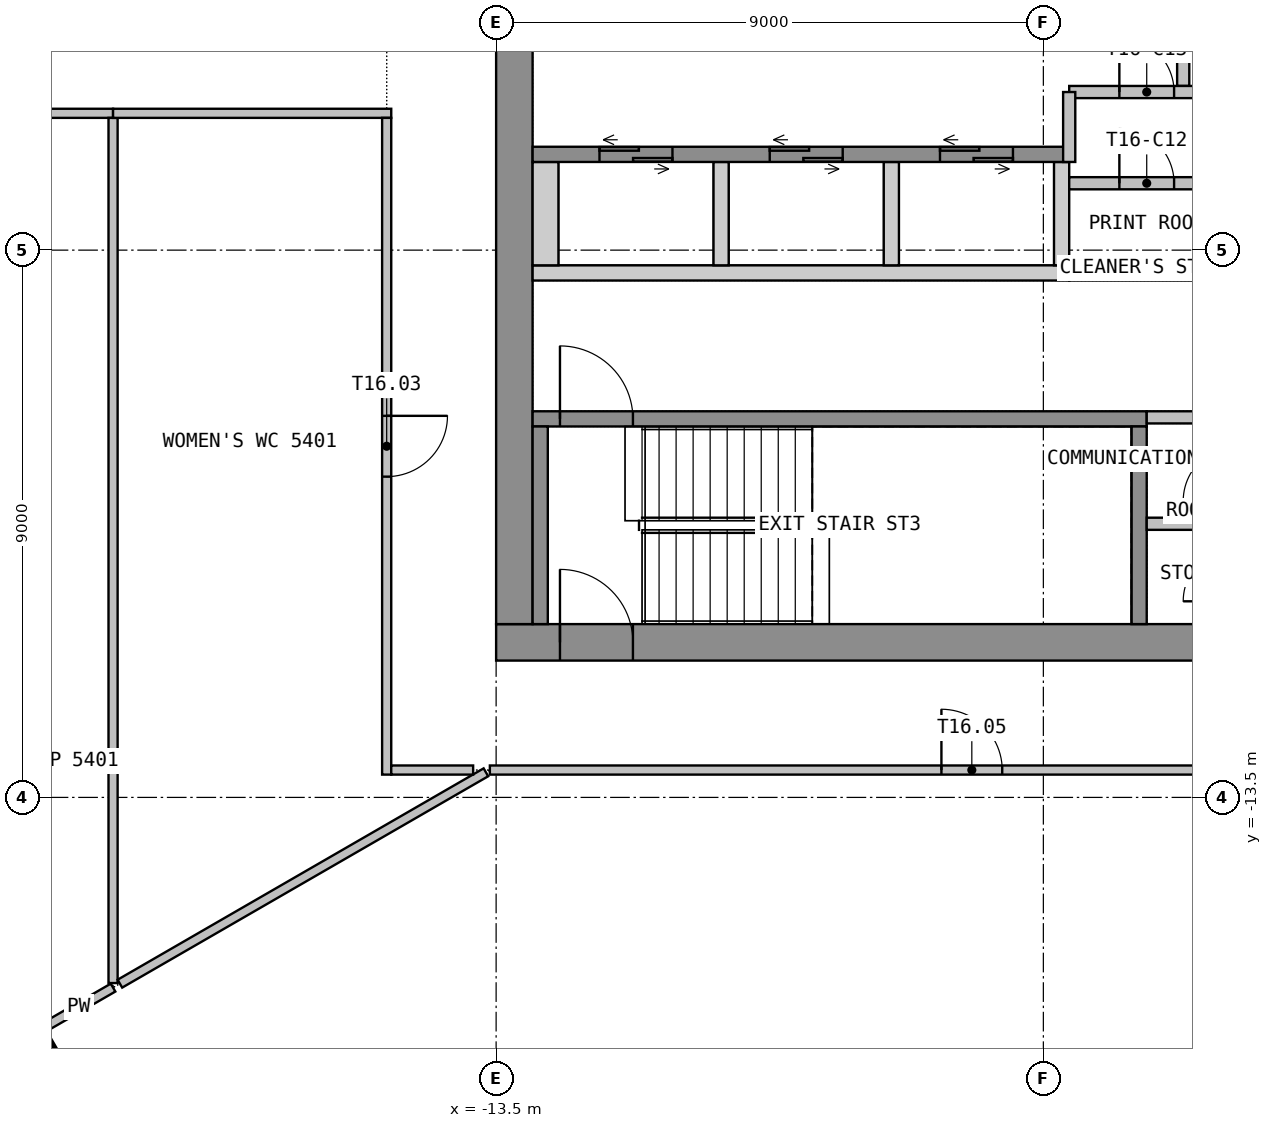
"""IFC4 building model, lengths in metres.
Left out: names, types, materials, properties, quantities, classifications, styles, units other than length and angle.
Written with IfcOpenShell. Run it as: python <this file> out.ifc"""

import sys

from ifc_helpers import new_model, si_unit, direction, frame, frame_2d, origin, origin_2d, place, context, subcontext, project, spatial, polyline, rectangle, outline, extrude, element, fill, save


model = new_model("IFC4")
c1 = context("Model", 3, precision=1e-05, world=origin(), true_north=direction((0.0, 1.0)))
c2 = subcontext(c1, "Body", "Model", "MODEL_VIEW")
j1 = project(units=[si_unit("LENGTHUNIT", "METRE"), si_unit("PLANEANGLEUNIT", "RADIAN")], contexts=[c1])
p1 = place(None, origin())
s1 = spatial("IfcSite", under=j1, at=p1, CompositionType="ELEMENT")
p2 = place(p1, origin())
s2 = spatial("IfcBuilding", under=s1, at=p2, CompositionType="ELEMENT")
p3 = place(p2, frame((0.0, 0.0, 219.0)))
s3 = spatial("IfcBuildingStorey", under=s2, at=p3, CompositionType="ELEMENT", Elevation=219.0)
p4 = place(p3, frame((-21.421, -17.563, 0.0), z_axis=(0.0, 0.0, 1.0), x_axis=(0.5, -0.866025403784, 0.0)))
e1 = element("IfcColumn", 1, at=p4, inside=s3, PredefinedType="COLUMN", context=c2, shape_type="SweptSolid", body=[
    extrude(rectangle(XDim=0.8, YDim=1.1, at=origin_2d()), origin(), (0.0, 0.0, 1.0), 3.55),
])
p5 = place(p3, frame((-13.5, -10.95, 0.0), z_axis=(0.0, 0.0, 1.0), x_axis=(1.0, 0.0, 0.0)))
e2 = element("IfcWall", 2, at=p5, inside=s3, PredefinedType="SHEAR", context=c2, shape_type="SweptSolid", body=[
    extrude(rectangle(XDim=27.0, YDim=0.6, at=frame_2d((13.5, 0.0))), origin(), (0.0, 0.0, 1.0), 3.55),
])
p6 = place(p5, frame((12.3, 0.0, 0.0)))
e3 = element("IfcOpeningElement", 3, at=p6, cuts=e2, PredefinedType="OPENING", context=c2, shape_type="SweptSolid", body=[
    extrude(rectangle(XDim=2.4, YDim=2.1, at=frame_2d((1.2, 1.05))), frame((0.0, 0.31, 0.0), z_axis=(0.0, -1.0, 0.0), x_axis=(1.0, 0.0, 0.0)), (0.0, 0.0, 1.0), 0.62),
])
p7 = place(p5, frame((1.05, 0.0, 0.0)))
e4 = element("IfcOpeningElement", 4, at=p7, cuts=e2, PredefinedType="OPENING", context=c2, shape_type="SweptSolid", body=[
    extrude(rectangle(XDim=1.2, YDim=2.1, at=frame_2d((0.6, 1.05))), frame((0.0, 0.31, 0.0), z_axis=(0.0, -1.0, 0.0), x_axis=(1.0, 0.0, 0.0)), (0.0, 0.0, 1.0), 0.62),
])
p8 = place(p5, frame((24.75, 0.0, 0.0)))
e5 = element("IfcOpeningElement", 5, at=p8, cuts=e2, PredefinedType="OPENING", context=c2, shape_type="SweptSolid", body=[
    extrude(rectangle(XDim=1.2, YDim=2.1, at=frame_2d((0.6, 1.05))), frame((0.0, 0.31, 0.0), z_axis=(0.0, -1.0, 0.0), x_axis=(1.0, 0.0, 0.0)), (0.0, 0.0, 1.0), 0.62),
])
p9 = place(p3, frame((-13.2, -10.65, 0.0), z_axis=(0.0, 0.0, 1.0), x_axis=(0.0, 1.0, 0.0)))
e6 = element("IfcWall", 6, at=p9, inside=s3, PredefinedType="SHEAR", context=c2, shape_type="SweptSolid", body=[
    extrude(rectangle(XDim=21.3, YDim=0.6, at=frame_2d((10.65, 0.0))), origin(), (0.0, 0.0, 1.0), 3.55),
])
p10 = place(p9, frame((9.45, 0.0, 0.0)))
e7 = element("IfcOpeningElement", 7, at=p10, cuts=e6, PredefinedType="OPENING", context=c2, shape_type="SweptSolid", body=[
    extrude(rectangle(XDim=2.4, YDim=2.1, at=frame_2d((1.2, 1.05))), frame((0.0, 0.31, 0.0), z_axis=(0.0, -1.0, 0.0), x_axis=(1.0, 0.0, 0.0)), (0.0, 0.0, 1.0), 0.62),
])
p11 = place(p3, origin())
e8 = element("IfcWall", 8, at=p11, inside=s3, PredefinedType="SHEAR", context=c2, shape_type="SweptSolid", body=[
    extrude(outline(polyline([(-12.9, -5.0), (-4.075, -5.0), (-4.075, -4.75), (-12.9, -4.75), (-12.9, -5.0)])), origin(), (0.0, 0.0, 1.0), 3.55),
])
p12 = place(p3, origin())
e9 = element("IfcWall", 9, at=p12, inside=s3, PredefinedType="SHEAR", context=c2, shape_type="SweptSolid", body=[
    extrude(outline(polyline([(-12.9, -4.75), (-12.475, -4.75), (-12.475, -3.05), (-12.9, -3.05), (-12.9, -4.75)])), origin(), (0.0, 0.0, 1.0), 3.55),
])
p13 = place(p3, origin())
e10 = element("IfcWall", 10, at=p13, inside=s3, PredefinedType="SHEAR", context=c2, shape_type="SweptSolid", body=[
    extrude(outline(polyline([(-9.925, -4.75), (-9.675, -4.75), (-9.675, -3.05), (-9.925, -3.05), (-9.925, -4.75)])), origin(), (0.0, 0.0, 1.0), 3.55),
])
p14 = place(p3, origin())
e11 = element("IfcWall", 11, at=p14, inside=s3, PredefinedType="SHEAR", context=c2, shape_type="SweptSolid", body=[
    extrude(outline(polyline([(-7.125, -4.75), (-6.875, -4.75), (-6.875, -3.05), (-7.125, -3.05), (-7.125, -4.75)])), origin(), (0.0, 0.0, 1.0), 3.55),
])
p15 = place(p3, origin())
e12 = element("IfcWall", 12, at=p15, inside=s3, PredefinedType="SHEAR", context=c2, shape_type="SweptSolid", body=[
    extrude(outline(polyline([(-4.325, -4.75), (-4.075, -4.75), (-4.075, -3.05), (-4.325, -3.05), (-4.325, -4.75)])), origin(), (0.0, 0.0, 1.0), 3.55),
])
p16 = place(p3, frame((-12.9, -2.925, 0.0), z_axis=(0.0, 0.0, 1.0), x_axis=(1.0, 0.0, 0.0)))
e13 = element("IfcWall", 13, at=p16, inside=s3, PredefinedType="SHEAR", context=c2, shape_type="SweptSolid", body=[
    extrude(rectangle(XDim=8.825, YDim=0.25, at=frame_2d((4.413, 0.0))), origin(), (0.0, 0.0, 1.0), 3.55),
])
p17 = place(p16, frame((1.1, 0.0, 0.0)))
e14 = element("IfcOpeningElement", 14, at=p17, cuts=e13, PredefinedType="OPENING", context=c2, shape_type="SweptSolid", body=[
    extrude(rectangle(XDim=1.2, YDim=2.1, at=frame_2d((0.6, 1.05))), frame((0.0, 0.135, 0.0), z_axis=(0.0, -1.0, 0.0), x_axis=(1.0, 0.0, 0.0)), (0.0, 0.0, 1.0), 0.27),
])
p18 = place(p16, frame((3.9, 0.0, 0.0)))
e15 = element("IfcOpeningElement", 15, at=p18, cuts=e13, PredefinedType="OPENING", context=c2, shape_type="SweptSolid", body=[
    extrude(rectangle(XDim=1.2, YDim=2.1, at=frame_2d((0.6, 1.05))), frame((0.0, 0.135, 0.0), z_axis=(0.0, -1.0, 0.0), x_axis=(1.0, 0.0, 0.0)), (0.0, 0.0, 1.0), 0.27),
])
p19 = place(p16, frame((6.7, 0.0, 0.0)))
e16 = element("IfcOpeningElement", 16, at=p19, cuts=e13, PredefinedType="OPENING", context=c2, shape_type="SweptSolid", body=[
    extrude(rectangle(XDim=1.2, YDim=2.1, at=frame_2d((0.6, 1.05))), frame((0.0, 0.135, 0.0), z_axis=(0.0, -1.0, 0.0), x_axis=(1.0, 0.0, 0.0)), (0.0, 0.0, 1.0), 0.27),
])
p20 = place(p3, frame((-2.2, -1.8, 0.0), z_axis=(0.0, 0.0, 1.0), x_axis=(0.0, 1.0, 0.0)))
e17 = element("IfcWall", 17, at=p20, inside=s3, PredefinedType="PARTITIONING", context=c2, shape_type="SweptSolid", body=[
    extrude(rectangle(XDim=3.6, YDim=0.2, at=frame_2d((1.8, 0.0))), origin(), (0.0, 0.0, 1.0), 3.55),
])
p21 = place(p20, frame((1.2, 0.0, 0.0)))
e18 = element("IfcOpeningElement", 18, at=p21, cuts=e17, PredefinedType="OPENING", context=c2, shape_type="SweptSolid", body=[
    extrude(rectangle(XDim=1.2, YDim=2.1, at=frame_2d((0.6, 1.05))), frame((0.0, 0.11, 0.0), z_axis=(0.0, -1.0, 0.0), x_axis=(1.0, 0.0, 0.0)), (0.0, 0.0, 1.0), 0.22),
])
p22 = place(p3, frame((-12.9, -7.275, 0.0), z_axis=(0.0, 0.0, 1.0), x_axis=(1.0, 0.0, 0.0)))
e19 = element("IfcWall", 19, at=p22, inside=s3, PredefinedType="SHEAR", context=c2, shape_type="SweptSolid", body=[
    extrude(rectangle(XDim=10.1, YDim=0.25, at=frame_2d((5.05, 0.0))), origin(), (0.0, 0.0, 1.0), 3.55),
])
p23 = place(p22, frame((0.45, 0.0, 0.0)))
e20 = element("IfcOpeningElement", 20, at=p23, cuts=e19, PredefinedType="OPENING", context=c2, shape_type="SweptSolid", body=[
    extrude(rectangle(XDim=1.2, YDim=2.1, at=frame_2d((0.6, 1.05))), frame((0.0, 0.135, 0.0), z_axis=(0.0, -1.0, 0.0), x_axis=(1.0, 0.0, 0.0)), (0.0, 0.0, 1.0), 0.27),
])
for number, where, z_axis, x_axis in (
    (21, (-12.775, -10.65, 0.0), (0.0, 0.0, 1.0), (0.0, 1.0, 0.0)),
    (22, (-2.925, -10.65, 0.0), (0.0, 0.0, 1.0), (0.0, 1.0, 0.0)),
):
    element("IfcWall", number, at=place(p3, frame(where, z_axis=z_axis, x_axis=x_axis)), inside=s3, PredefinedType="SHEAR", context=c2, shape_type="SweptSolid", body=[
        extrude(rectangle(XDim=3.25, YDim=0.25, at=frame_2d((1.625, 0.0))), origin(), (0.0, 0.0, 1.0), 3.55),
    ])
for number, where, z_axis, x_axis in (
    (23, (-2.8, -7.25, 0.0), (0.0, 0.0, 1.0), (1.0, 0.0, 0.0)),
    (24, (-2.8, -9.0, 0.0), (0.0, 0.0, 1.0), (1.0, 0.0, 0.0)),
):
    element("IfcWall", number, at=place(p3, frame(where, z_axis=z_axis, x_axis=x_axis)), inside=s3, PredefinedType="PARTITIONING", context=c2, shape_type="SweptSolid", body=[
        extrude(rectangle(XDim=1.4, YDim=0.2, at=frame_2d((0.7, 0.0))), origin(), (0.0, 0.0, 1.0), 3.55),
    ])
p24 = place(p3, frame((-4.075, -3.4, 0.0), z_axis=(0.0, 0.0, 1.0), x_axis=(1.0, 0.0, 0.0)))
e25 = element("IfcWall", 25, at=p24, inside=s3, PredefinedType="PARTITIONING", context=c2, shape_type="SweptSolid", body=[
    extrude(rectangle(XDim=2.55, YDim=0.2, at=frame_2d((1.275, 0.0))), origin(), (0.0, 0.0, 1.0), 3.55),
])
p25 = place(p24, frame((0.825, 0.0, 0.0)))
e26 = element("IfcOpeningElement", 26, at=p25, cuts=e25, PredefinedType="OPENING", context=c2, shape_type="SweptSolid", body=[
    extrude(rectangle(XDim=0.9, YDim=2.1, at=frame_2d((0.45, 1.05))), frame((0.0, 0.11, 0.0), z_axis=(0.0, -1.0, 0.0), x_axis=(1.0, 0.0, 0.0)), (0.0, 0.0, 1.0), 0.22),
])
p26 = place(p3, frame((-4.075, -1.9, 0.0), z_axis=(0.0, 0.0, 1.0), x_axis=(1.0, 0.0, 0.0)))
e27 = element("IfcWall", 27, at=p26, inside=s3, PredefinedType="PARTITIONING", context=c2, shape_type="SweptSolid", body=[
    extrude(rectangle(XDim=2.55, YDim=0.2, at=frame_2d((1.275, 0.0))), origin(), (0.0, 0.0, 1.0), 3.55),
])
p27 = place(p26, frame((0.825, 0.0, 0.0)))
e28 = element("IfcOpeningElement", 28, at=p27, cuts=e27, PredefinedType="OPENING", context=c2, shape_type="SweptSolid", body=[
    extrude(rectangle(XDim=0.9, YDim=2.1, at=frame_2d((0.45, 1.05))), frame((0.0, 0.11, 0.0), z_axis=(0.0, -1.0, 0.0), x_axis=(1.0, 0.0, 0.0)), (0.0, 0.0, 1.0), 0.22),
])
p28 = place(p3, frame((-4.075, -4.9, 0.0), z_axis=(0.0, 0.0, 1.0), x_axis=(1.0, 0.0, 0.0)))
e29 = element("IfcWall", 29, at=p28, inside=s3, PredefinedType="PARTITIONING", context=c2, shape_type="SweptSolid", body=[
    extrude(rectangle(XDim=2.55, YDim=0.2, at=frame_2d((1.275, 0.0))), origin(), (0.0, 0.0, 1.0), 3.55),
])
p29 = place(p3, frame((-4.075, -1.9, 0.0), z_axis=(0.0, 0.0, 1.0), x_axis=(0.0, -1.0, 0.0)))
e30 = element("IfcWall", 30, at=p29, inside=s3, PredefinedType="PARTITIONING", context=c2, shape_type="SweptSolid", body=[
    extrude(rectangle(XDim=1.15, YDim=0.2, at=frame_2d((0.575, 0.0))), origin(), (0.0, 0.0, 1.0), 3.55),
])
p30 = place(p3, frame((-19.8, -2.25, 0.0), z_axis=(0.0, 0.0, 1.0), x_axis=(-1.0, 0.0, 0.0)))
e31 = element("IfcWall", 31, at=p30, inside=s3, PredefinedType="PARTITIONING", context=c2, shape_type="SweptSolid", body=[
    extrude(rectangle(XDim=9.785, YDim=0.15, at=frame_2d((4.893, 0.0))), origin(), (0.0, 0.0, 1.0), 3.55),
])
p31 = place(p30, frame((4.393, 0.0, 0.0)))
e32 = element("IfcOpeningElement", 32, at=p31, cuts=e31, PredefinedType="OPENING", context=c2, shape_type="SweptSolid", body=[
    extrude(rectangle(XDim=1.0, YDim=2.1, at=frame_2d((0.5, 1.05))), frame((0.0, 0.085, 0.0), z_axis=(0.0, -1.0, 0.0), x_axis=(1.0, 0.0, 0.0)), (0.0, 0.0, 1.0), 0.17),
])
p32 = place(p3, frame((-19.8, -16.628, 0.0), z_axis=(0.0, 0.0, 1.0), x_axis=(-0.866157475642, -0.499771175029, 0.0)))
e33 = element("IfcWall", 33, at=p32, inside=s3, PredefinedType="PARTITIONING", context=c2, shape_type="SweptSolid", body=[
    extrude(rectangle(XDim=1.301, YDim=0.15, at=frame_2d((0.651, 0.0))), origin(), (0.0, 0.0, 1.0), 3.55),
])
p33 = place(p3, frame((-19.8, -2.325, 0.0), z_axis=(0.0, 0.0, 1.0), x_axis=(0.0, -1.0, 0.0)))
e34 = element("IfcWall", 34, at=p33, inside=s3, PredefinedType="PARTITIONING", context=c2, shape_type="SweptSolid", body=[
    extrude(rectangle(XDim=14.228, YDim=0.15, at=frame_2d((7.114, 0.0))), origin(), (0.0, 0.0, 1.0), 3.55),
])
p34 = place(p3, frame((-13.668, -13.087, 0.0), z_axis=(0.0, 0.0, 1.0), x_axis=(-0.866012448988, -0.500022437694, 0.0)))
e35 = element("IfcWall", 35, at=p34, inside=s3, PredefinedType="PARTITIONING", context=c2, shape_type="SweptSolid", body=[
    extrude(rectangle(XDim=6.951, YDim=0.15, at=frame_2d((3.476, 0.0))), origin(), (0.0, 0.0, 1.0), 3.55),
])
p35 = place(p3, frame((-15.225, -2.25, 0.0), z_axis=(0.0, 0.0, 1.0), x_axis=(-1.0, 0.0, 0.0)))
e36 = element("IfcWall", 36, at=p35, inside=s3, PredefinedType="PARTITIONING", context=c2, shape_type="SweptSolid", body=[
    extrude(rectangle(XDim=4.575, YDim=0.15, at=frame_2d((2.288, 0.0))), origin(), (0.0, 0.0, 1.0), 3.55),
])
p36 = place(p3, frame((-15.3, -2.325, 0.0), z_axis=(0.0, 0.0, 1.0), x_axis=(0.0, -1.0, 0.0)))
e37 = element("IfcWall", 37, at=p36, inside=s3, PredefinedType="PARTITIONING", context=c2, shape_type="SweptSolid", body=[
    extrude(rectangle(XDim=10.8, YDim=0.15, at=frame_2d((5.4, 0.0))), origin(), (0.0, 0.0, 1.0), 3.55),
])
p37 = place(p36, frame((4.9, 0.0, 0.0)))
e38 = element("IfcOpeningElement", 38, at=p37, cuts=e37, PredefinedType="OPENING", context=c2, shape_type="SweptSolid", body=[
    extrude(rectangle(XDim=1.0, YDim=2.1, at=frame_2d((0.5, 1.05))), frame((0.0, 0.085, 0.0), z_axis=(0.0, -1.0, 0.0), x_axis=(1.0, 0.0, 0.0)), (0.0, 0.0, 1.0), 0.17),
])
p38 = place(p3, frame((-15.225, -13.05, 0.0), z_axis=(0.0, 0.0, 1.0), x_axis=(1.0, 0.0, 0.0)))
e39 = element("IfcWall", 39, at=p38, inside=s3, PredefinedType="PARTITIONING", context=c2, shape_type="SweptSolid", body=[
    extrude(rectangle(XDim=1.347, YDim=0.15, at=frame_2d((0.674, 0.0))), origin(), (0.0, 0.0, 1.0), 3.55),
])
p39 = place(p3, frame((-13.603, -13.05, 0.0), z_axis=(0.0, 0.0, 1.0), x_axis=(1.0, 0.0, 0.0)))
e40 = element("IfcWall", 40, at=p39, inside=s3, PredefinedType="PARTITIONING", context=c2, shape_type="SweptSolid", body=[
    extrude(rectangle(XDim=15.853, YDim=0.15, at=frame_2d((7.927, 0.0))), origin(), (0.0, 0.0, 1.0), 3.55),
])
p40 = place(p39, frame((7.427, 0.0, 0.0)))
e41 = element("IfcOpeningElement", 41, at=p40, cuts=e40, PredefinedType="OPENING", context=c2, shape_type="SweptSolid", body=[
    extrude(rectangle(XDim=1.0, YDim=2.1, at=frame_2d((0.5, 1.05))), frame((0.0, 0.085, 0.0), z_axis=(0.0, -1.0, 0.0), x_axis=(1.0, 0.0, 0.0)), (0.0, 0.0, 1.0), 0.17),
])
p41 = place(p7, origin())
e42 = element("IfcDoor", 42, at=p41, inside=s3, OperationType="SINGLE_SWING_RIGHT", PredefinedType="DOOR", context=c2, shape_type="SweptSolid", body=[
    extrude(rectangle(XDim=1.2, YDim=2.1, at=frame_2d((0.6, 1.05))), frame((0.0, 0.025, 0.0), z_axis=(0.0, -1.0, 0.0), x_axis=(1.0, 0.0, 0.0)), (0.0, 0.0, 1.0), 0.05),
])
fill(e4, e42)
p42 = place(p17, origin())
e43 = element("IfcDoor", 43, at=p42, inside=s3, OperationType="DOUBLE_DOOR_SLIDING", PredefinedType="DOOR", context=c2, shape_type="SweptSolid", body=[
    extrude(rectangle(XDim=1.2, YDim=2.1, at=frame_2d((0.6, 1.05))), frame((0.0, 0.025, 0.0), z_axis=(0.0, -1.0, 0.0), x_axis=(1.0, 0.0, 0.0)), (0.0, 0.0, 1.0), 0.05),
])
fill(e14, e43)
p43 = place(p18, origin())
e44 = element("IfcDoor", 44, at=p43, inside=s3, OperationType="DOUBLE_DOOR_SLIDING", PredefinedType="DOOR", context=c2, shape_type="SweptSolid", body=[
    extrude(rectangle(XDim=1.2, YDim=2.1, at=frame_2d((0.6, 1.05))), frame((0.0, 0.025, 0.0), z_axis=(0.0, -1.0, 0.0), x_axis=(1.0, 0.0, 0.0)), (0.0, 0.0, 1.0), 0.05),
])
fill(e15, e44)
p44 = place(p19, origin())
e45 = element("IfcDoor", 45, at=p44, inside=s3, OperationType="DOUBLE_DOOR_SLIDING", PredefinedType="DOOR", context=c2, shape_type="SweptSolid", body=[
    extrude(rectangle(XDim=1.2, YDim=2.1, at=frame_2d((0.6, 1.05))), frame((0.0, 0.025, 0.0), z_axis=(0.0, -1.0, 0.0), x_axis=(1.0, 0.0, 0.0)), (0.0, 0.0, 1.0), 0.05),
])
fill(e16, e45)
p45 = place(p23, origin())
e46 = element("IfcDoor", 46, at=p45, inside=s3, OperationType="SINGLE_SWING_LEFT", PredefinedType="DOOR", context=c2, shape_type="SweptSolid", body=[
    extrude(rectangle(XDim=1.2, YDim=2.1, at=frame_2d((0.6, 1.05))), frame((0.0, 0.025, 0.0), z_axis=(0.0, -1.0, 0.0), x_axis=(1.0, 0.0, 0.0)), (0.0, 0.0, 1.0), 0.05),
])
fill(e20, e46)
p46 = place(p25, origin())
e47 = element("IfcDoor", 47, at=p46, inside=s3, OperationType="SINGLE_SWING_LEFT", PredefinedType="DOOR", context=c2, shape_type="SweptSolid", body=[
    extrude(rectangle(XDim=0.9, YDim=2.1, at=frame_2d((0.45, 1.05))), frame((0.0, 0.025, 0.0), z_axis=(0.0, -1.0, 0.0), x_axis=(1.0, 0.0, 0.0)), (0.0, 0.0, 1.0), 0.05),
])
fill(e26, e47)
p47 = place(p27, origin())
e48 = element("IfcDoor", 48, at=p47, inside=s3, OperationType="SINGLE_SWING_LEFT", PredefinedType="DOOR", context=c2, shape_type="SweptSolid", body=[
    extrude(rectangle(XDim=0.9, YDim=2.1, at=frame_2d((0.45, 1.05))), frame((0.0, 0.025, 0.0), z_axis=(0.0, -1.0, 0.0), x_axis=(1.0, 0.0, 0.0)), (0.0, 0.0, 1.0), 0.05),
])
fill(e28, e48)
p48 = place(p37, origin())
e49 = element("IfcDoor", 49, at=p48, inside=s3, OperationType="SINGLE_SWING_RIGHT", PredefinedType="DOOR", context=c2, shape_type="SweptSolid", body=[
    extrude(rectangle(XDim=1.0, YDim=2.1, at=frame_2d((0.5, 1.05))), frame((0.0, 0.025, 0.0), z_axis=(0.0, -1.0, 0.0), x_axis=(1.0, 0.0, 0.0)), (0.0, 0.0, 1.0), 0.05),
])
fill(e38, e49)
p49 = place(p40, origin())
e50 = element("IfcDoor", 50, at=p49, inside=s3, OperationType="SINGLE_SWING_RIGHT", PredefinedType="DOOR", context=c2, shape_type="SweptSolid", body=[
    extrude(rectangle(XDim=1.0, YDim=2.1, at=frame_2d((0.5, 1.05))), frame((0.0, 0.025, 0.0), z_axis=(0.0, -1.0, 0.0), x_axis=(1.0, 0.0, 0.0)), (0.0, 0.0, 1.0), 0.05),
])
fill(e41, e50)
save(model, sys.argv[1])
